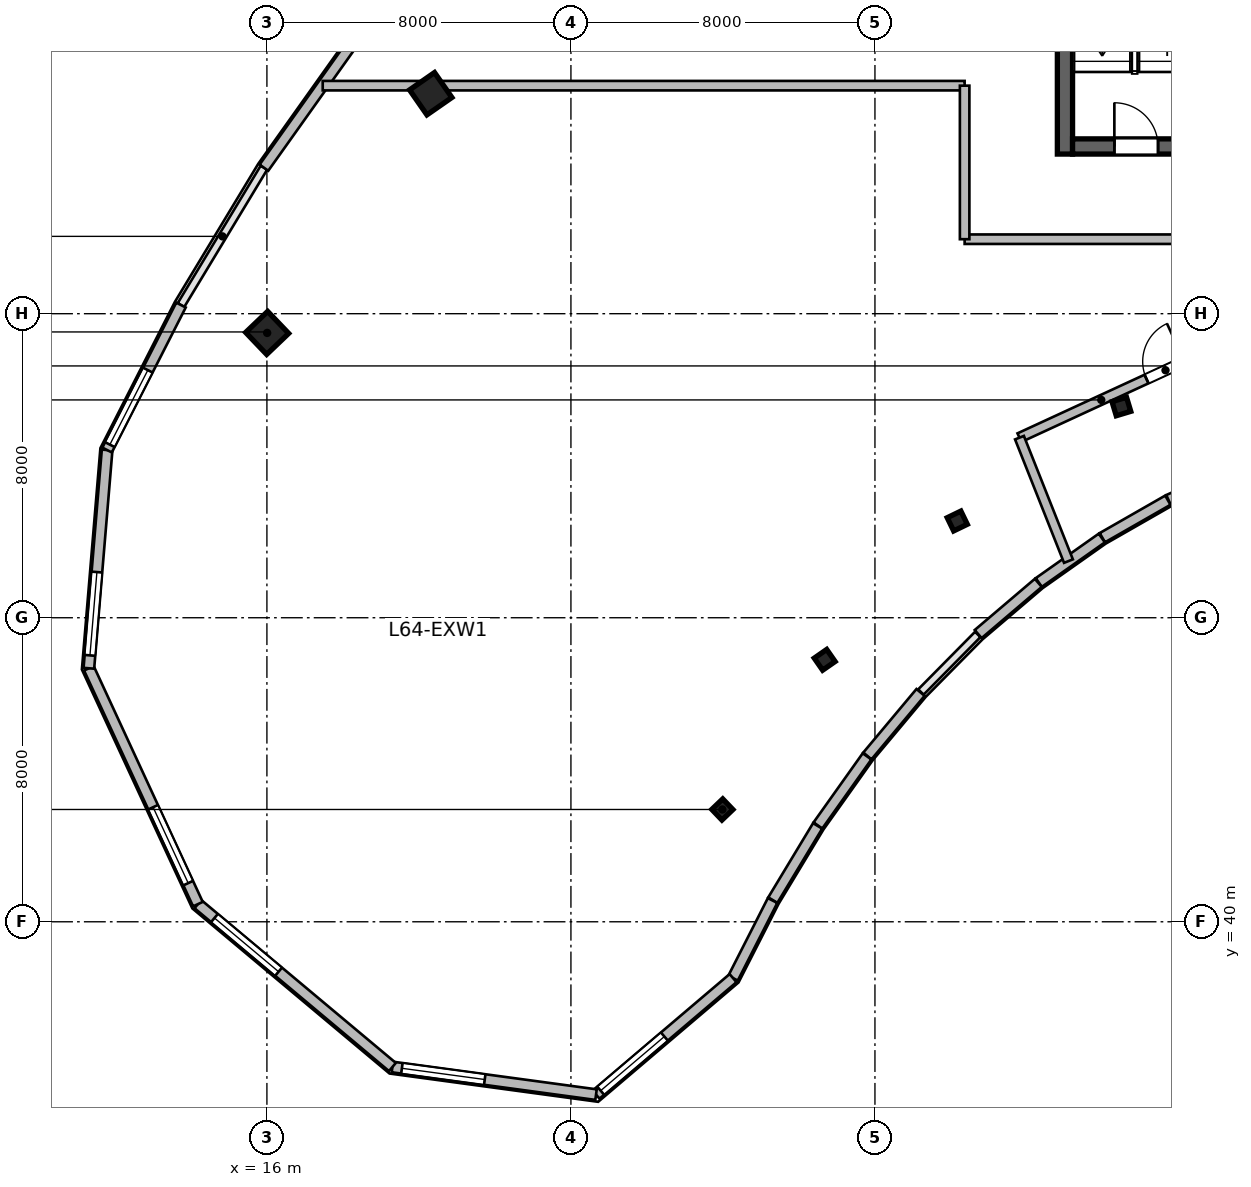
"""IFC4 building model, lengths in metres.
Left out: names, types, materials, properties, quantities, classifications, styles, units other than length and angle.
Written with IfcOpenShell. Run it as: python <this file> out.ifc"""

import sys

from ifc_helpers import new_model, si_unit, direction, frame, frame_2d, origin, origin_2d, place, context, subcontext, project, spatial, rectangle, i_section, extrude, source, transform, mapped, element, fill, save


model = new_model("IFC4")
c1 = context("Model", 3, precision=1e-05, world=origin(), true_north=direction((0.0, 1.0)))
c2 = subcontext(c1, "Body", "Model", "MODEL_VIEW")
j1 = project(units=[si_unit("LENGTHUNIT", "METRE"), si_unit("PLANEANGLEUNIT", "RADIAN")], contexts=[c1])
p1 = place(None, origin())
s1 = spatial("IfcSite", under=j1, at=p1, CompositionType="ELEMENT")
p2 = place(p1, origin())
s2 = spatial("IfcBuilding", under=s1, at=p2, CompositionType="ELEMENT")
p3 = place(p2, frame((0.0, 0.0, 264.0)))
s3 = spatial("IfcBuildingStorey", under=s2, at=p3, CompositionType="ELEMENT", Elevation=264.0)
m1 = source(origin(), c2, "Body", "SweptSolid", [
    extrude(rectangle(XDim=12.0, YDim=0.4, at=frame_2d((6.0, 0.0))), origin(), (0.0, 0.0, 1.0), 3.9),
])
p4 = place(p3, frame((37.0, 60.2, 0.0), z_axis=(0.0, 0.0, 1.0), x_axis=(0.0, 1.0, 0.0)))
e1 = element("IfcWall", 1, at=p4, inside=s3, PredefinedType="SHEAR", context=c2, shape_type="MappedRepresentation", body=[
    mapped(m1, transform((0.0, 0.0, 0.0), scale=1.0)),
])
m2 = source(origin(), c2, "Body", "SweptSolid", [
    extrude(rectangle(XDim=21.6, YDim=0.4, at=frame_2d((10.8, 0.0))), origin(), (0.0, 0.0, 1.0), 3.9),
])
p5 = place(p3, frame((37.2, 60.4, 0.0), z_axis=(0.0, 0.0, 1.0), x_axis=(1.0, 0.0, 0.0)))
e2 = element("IfcWall", 2, at=p5, inside=s3, PredefinedType="SHEAR", context=c2, shape_type="MappedRepresentation", body=[
    mapped(m2, transform((0.0, 0.0, 0.0), scale=1.0)),
])
p6 = place(p5, frame((1.1, 0.0, 0.0)))
e3 = element("IfcOpeningElement", 3, at=p6, cuts=e2, PredefinedType="OPENING", context=c2, shape_type="SweptSolid", body=[
    extrude(rectangle(XDim=1.15, YDim=2.15, at=frame_2d((0.575, 1.075))), frame((0.0, 0.21, 0.0), z_axis=(0.0, -1.0, 0.0), x_axis=(1.0, 0.0, 0.0)), (0.0, 0.0, 1.0), 0.42),
])
p7 = place(p5, frame((19.5, 0.0, 0.0)))
e4 = element("IfcOpeningElement", 4, at=p7, cuts=e2, PredefinedType="OPENING", context=c2, shape_type="SweptSolid", body=[
    extrude(rectangle(XDim=0.9, YDim=2.1, at=frame_2d((0.45, 1.05))), frame((0.0, 0.21, 0.0), z_axis=(0.0, -1.0, 0.0), x_axis=(1.0, 0.0, 0.0)), (0.0, 0.0, 1.0), 0.42),
])
p8 = place(p5, frame((12.02, 0.0, 0.0)))
e5 = element("IfcOpeningElement", 5, at=p8, cuts=e2, PredefinedType="OPENING", context=c2, shape_type="SweptSolid", body=[
    extrude(rectangle(XDim=1.6, YDim=2.15, at=frame_2d((0.8, 1.075))), frame((0.0, 0.21, 0.0), z_axis=(0.0, -1.0, 0.0), x_axis=(1.0, 0.0, 0.0)), (0.0, 0.0, 1.0), 0.42),
])
m3 = source(origin(), c2, "Body", "SweptSolid", [
    extrude(i_section(OverallWidth=0.399, OverallDepth=0.387, WebThickness=0.021, FlangeThickness=0.033, at=origin_2d()), origin(), (0.0, 0.0, 1.0), 3.9),
])
p9 = place(p3, frame((27.985, 42.955, 0.0), z_axis=(0.0, 0.0, 1.0), x_axis=(-0.690756218984, 0.723087716626, 0.0)))
e6 = element("IfcColumn", 6, at=p9, inside=s3, PredefinedType="COLUMN", context=c2, shape_type="MappedRepresentation", body=[
    mapped(m3, transform((0.0, 0.0, 0.0), scale=1.0)),
])
m4 = source(origin(), c2, "Body", "SweptSolid", [
    extrude(rectangle(XDim=0.8, YDim=0.8, at=origin_2d()), origin(), (0.0, 0.0, 1.0), 3.9),
])
p10 = place(p3, frame((16.007, 55.494, 0.0), z_axis=(0.0, 0.0, 1.0), x_axis=(-0.690756218984, 0.723087716626, 0.0)))
e7 = element("IfcColumn", 7, at=p10, inside=s3, PredefinedType="COLUMN", context=c2, shape_type="MappedRepresentation", body=[
    mapped(m4, transform((0.0, 0.0, 0.0), scale=1.0)),
])
p11 = place(p3, frame((30.677, 46.892, 0.0), z_axis=(0.0, 0.0, 1.0), x_axis=(-0.571143442153, 0.820850271661, 0.0)))
e8 = element("IfcColumn", 8, at=p11, inside=s3, PredefinedType="COLUMN", context=c2, shape_type="MappedRepresentation", body=[
    mapped(m3, transform((0.0, 0.0, 0.0), scale=1.0)),
])
p12 = place(p3, frame((20.311, 61.789, 0.0), z_axis=(0.0, 0.0, 1.0), x_axis=(-0.571143442153, 0.820850271661, 0.0)))
e9 = element("IfcColumn", 9, at=p12, inside=s3, PredefinedType="COLUMN", context=c2, shape_type="MappedRepresentation", body=[
    mapped(m4, transform((0.0, 0.0, 0.0), scale=1.0)),
])
for number, where, z_axis, x_axis in (
    (10, (34.166, 50.545, 0.0), (0.0, 0.0, 1.0), (-0.436, 0.9, 0.0)),
    (11, (38.485, 53.558, 0.0), (0.0, 0.0, 1.0), (-0.289, 0.957, 0.0)),
):
    element("IfcColumn", number, at=place(p3, frame(where, z_axis=z_axis, x_axis=x_axis)), inside=s3, PredefinedType="COLUMN", context=c2, shape_type="MappedRepresentation", body=[
        mapped(m3, transform((0.0, 0.0, 0.0), scale=1.0)),
    ])
m5 = source(origin(), c2, "Body", "SweptSolid", [
    extrude(rectangle(XDim=1.948, YDim=0.28, at=frame_2d((0.974, 0.0))), origin(), (0.0, 0.0, 1.0), 3.65),
])
p13 = place(p3, frame((41.501, 51.897, 0.0), z_axis=(0.0, 0.0, 1.0), x_axis=(-0.912712483043, -0.408602402461, 0.0)))
e12 = element("IfcWall", 12, at=p13, inside=s3, PredefinedType="SOLIDWALL", context=c2, shape_type="MappedRepresentation", body=[
    mapped(m5, transform((0.0, 0.0, 0.0), scale=1.0)),
])
m6 = source(origin(), c2, "Body", "SweptSolid", [
    extrude(rectangle(XDim=1.986, YDim=0.28, at=frame_2d((0.993, 0.0))), origin(), (0.0, 0.0, 1.0), 3.65),
])
p14 = place(p3, frame((39.708, 51.093, 0.0), z_axis=(0.0, 0.0, 1.0), x_axis=(-0.867940364671, -0.496668423976, 0.0)))
e13 = element("IfcWall", 13, at=p14, inside=s3, PredefinedType="SOLIDWALL", context=c2, shape_type="MappedRepresentation", body=[
    mapped(m6, transform((0.0, 0.0, 0.0), scale=1.0)),
])
m7 = source(origin(), c2, "Body", "SweptSolid", [
    extrude(rectangle(XDim=2.03, YDim=0.28, at=frame_2d((1.015, 0.0))), origin(), (0.0, 0.0, 1.0), 3.65),
])
p15 = place(p3, frame((37.969, 50.097, 0.0), z_axis=(0.0, 0.0, 1.0), x_axis=(-0.816987864272, -0.576654861796, 0.0)))
e14 = element("IfcWall", 14, at=p15, inside=s3, PredefinedType="SOLIDWALL", context=c2, shape_type="MappedRepresentation", body=[
    mapped(m7, transform((0.0, 0.0, 0.0), scale=1.0)),
])
m8 = source(origin(), c2, "Body", "SweptSolid", [
    extrude(rectangle(XDim=2.078, YDim=0.28, at=frame_2d((1.039, 0.0))), origin(), (0.0, 0.0, 1.0), 3.65),
])
p16 = place(p3, frame((36.298, 48.917, 0.0), z_axis=(0.0, 0.0, 1.0), x_axis=(-0.761475215802, -0.648194026291, 0.0)))
e15 = element("IfcWall", 15, at=p16, inside=s3, PredefinedType="SOLIDWALL", context=c2, shape_type="MappedRepresentation", body=[
    mapped(m8, transform((0.0, 0.0, 0.0), scale=1.0)),
])
m9 = source(origin(), c2, "Body", "SweptSolid", [
    extrude(rectangle(XDim=2.18, YDim=0.28, at=frame_2d((1.09, 0.0))), origin(), (0.0, 0.0, 1.0), 3.65),
])
p17 = place(p3, frame((33.2, 46.035, 0.0), z_axis=(0.0, 0.0, 1.0), x_axis=(-0.641835571889, -0.766842290603, 0.0)))
e16 = element("IfcWall", 16, at=p17, inside=s3, PredefinedType="SOLIDWALL", context=c2, shape_type="MappedRepresentation", body=[
    mapped(m9, transform((0.0, 0.0, 0.0), scale=1.0)),
])
m10 = source(origin(), c2, "Body", "SweptSolid", [
    extrude(rectangle(XDim=2.231, YDim=0.28, at=frame_2d((1.116, 0.0))), origin(), (0.0, 0.0, 1.0), 3.65),
])
p18 = place(p3, frame((31.792, 44.352, 0.0), z_axis=(0.0, 0.0, 1.0), x_axis=(-0.579622296598, -0.814885263879, 0.0)))
e17 = element("IfcWall", 17, at=p18, inside=s3, PredefinedType="SOLIDWALL", context=c2, shape_type="MappedRepresentation", body=[
    mapped(m10, transform((0.0, 0.0, 0.0), scale=1.0)),
])
m11 = source(origin(), c2, "Body", "SweptSolid", [
    extrude(rectangle(XDim=2.281, YDim=0.28, at=frame_2d((1.14, 0.0))), origin(), (0.0, 0.0, 1.0), 3.65),
])
p19 = place(p3, frame((30.492, 42.523, 0.0), z_axis=(0.0, 0.0, 1.0), x_axis=(-0.516917942662, -0.856034952881, 0.0)))
e18 = element("IfcWall", 18, at=p19, inside=s3, PredefinedType="SOLIDWALL", context=c2, shape_type="MappedRepresentation", body=[
    mapped(m11, transform((0.0, 0.0, 0.0), scale=1.0)),
])
m12 = source(origin(), c2, "Body", "SweptSolid", [
    extrude(rectangle(XDim=2.292, YDim=0.28, at=frame_2d((1.146, 0.0))), origin(), (0.0, 0.0, 1.0), 3.65),
])
p20 = place(p3, frame((29.306, 40.559, 0.0), z_axis=(0.0, 0.0, 1.0), x_axis=(-0.453933760778, -0.891035431858, 0.0)))
e19 = element("IfcWall", 19, at=p20, inside=s3, PredefinedType="SOLIDWALL", context=c2, shape_type="MappedRepresentation", body=[
    mapped(m12, transform((0.0, 0.0, 0.0), scale=1.0)),
])
m13 = source(origin(), c2, "Body", "SweptSolid", [
    extrude(rectangle(XDim=4.732, YDim=0.28, at=frame_2d((2.366, 0.0))), origin(), (0.0, 0.0, 1.0), 3.65),
])
p21 = place(p3, frame((28.266, 38.517, 0.0), z_axis=(0.0, 0.0, 1.0), x_axis=(-0.761912583238, -0.647679871158, 0.0)))
e20 = element("IfcWall", 20, at=p21, inside=s3, PredefinedType="SOLIDWALL", context=c2, shape_type="MappedRepresentation", body=[
    mapped(m13, transform((0.0, 0.0, 0.0), scale=1.0)),
])
p22 = place(p21, frame((2.372, 0.0, 0.95)))
e21 = element("IfcOpeningElement", 21, at=p22, cuts=e20, PredefinedType="OPENING", context=c2, shape_type="SweptSolid", body=[
    extrude(rectangle(XDim=2.2, YDim=2.1, at=frame_2d((1.1, 1.05))), frame((0.0, 0.15, 0.0), z_axis=(0.0, -1.0, 0.0), x_axis=(1.0, 0.0, 0.0)), (0.0, 0.0, 1.0), 0.3),
])
m14 = source(origin(), c2, "Body", "SweptSolid", [
    extrude(rectangle(XDim=5.408, YDim=0.28, at=frame_2d((2.704, 0.0))), origin(), (0.0, 0.0, 1.0), 3.65),
])
p23 = place(p3, frame((24.661, 35.452, 0.0), z_axis=(0.0, 0.0, 1.0), x_axis=(-0.990932903229, 0.134357661853, 0.0)))
e22 = element("IfcWall", 22, at=p23, inside=s3, PredefinedType="SOLIDWALL", context=c2, shape_type="MappedRepresentation", body=[
    mapped(m14, transform((0.0, 0.0, 0.0), scale=1.0)),
])
p24 = place(p23, frame((2.956, 0.0, 0.95)))
e23 = element("IfcOpeningElement", 23, at=p24, cuts=e22, PredefinedType="OPENING", context=c2, shape_type="SweptSolid", body=[
    extrude(rectangle(XDim=2.2, YDim=2.1, at=frame_2d((1.1, 1.05))), frame((0.0, 0.15, 0.0), z_axis=(0.0, -1.0, 0.0), x_axis=(1.0, 0.0, 0.0)), (0.0, 0.0, 1.0), 0.3),
])
m15 = source(origin(), c2, "Body", "SweptSolid", [
    extrude(rectangle(XDim=6.675, YDim=0.28, at=frame_2d((3.338, 0.0))), origin(), (0.0, 0.0, 1.0), 3.65),
])
p25 = place(p3, frame((19.302, 36.179, 0.0), z_axis=(0.0, 0.0, 1.0), x_axis=(-0.766726273546, 0.641974159491, 0.0)))
e24 = element("IfcWall", 24, at=p25, inside=s3, PredefinedType="SOLIDWALL", context=c2, shape_type="MappedRepresentation", body=[
    mapped(m15, transform((0.0, 0.0, 0.0), scale=1.0)),
])
p26 = place(p25, frame((3.906, 0.0, 0.95)))
e25 = element("IfcOpeningElement", 25, at=p26, cuts=e24, PredefinedType="OPENING", context=c2, shape_type="SweptSolid", body=[
    extrude(rectangle(XDim=2.2, YDim=2.1, at=frame_2d((1.1, 1.05))), frame((0.0, 0.15, 0.0), z_axis=(0.0, -1.0, 0.0), x_axis=(1.0, 0.0, 0.0)), (0.0, 0.0, 1.0), 0.3),
])
m16 = source(origin(), c2, "Body", "SweptSolid", [
    extrude(rectangle(XDim=6.837, YDim=0.28, at=frame_2d((3.418, 0.0))), origin(), (0.0, 0.0, 1.0), 3.65),
])
p27 = place(p3, frame((14.184, 40.464, 0.0), z_axis=(0.0, 0.0, 1.0), x_axis=(-0.419621957862, 0.907698965781, 0.0)))
e26 = element("IfcWall", 26, at=p27, inside=s3, PredefinedType="SOLIDWALL", context=c2, shape_type="MappedRepresentation", body=[
    mapped(m16, transform((0.0, 0.0, 0.0), scale=1.0)),
])
p28 = place(p27, frame((0.609, 0.0, 0.95)))
e27 = element("IfcOpeningElement", 27, at=p28, cuts=e26, PredefinedType="OPENING", context=c2, shape_type="SweptSolid", body=[
    extrude(rectangle(XDim=2.2, YDim=2.1, at=frame_2d((1.1, 1.05))), frame((0.0, 0.15, 0.0), z_axis=(0.0, -1.0, 0.0), x_axis=(1.0, 0.0, 0.0)), (0.0, 0.0, 1.0), 0.3),
])
m17 = source(origin(), c2, "Body", "SweptSolid", [
    extrude(rectangle(XDim=5.763, YDim=0.28, at=frame_2d((2.881, 0.0))), origin(), (0.0, 0.0, 1.0), 3.65),
])
p29 = place(p3, frame((11.315, 46.67, 0.0), z_axis=(0.0, 0.0, 1.0), x_axis=(0.083290906041, 0.996525275631, 0.0)))
e28 = element("IfcWall", 28, at=p29, inside=s3, PredefinedType="SOLIDWALL", context=c2, shape_type="MappedRepresentation", body=[
    mapped(m17, transform((0.0, 0.0, 0.0), scale=1.0)),
])
p30 = place(p29, frame((0.341, 0.0, 0.95)))
e29 = element("IfcOpeningElement", 29, at=p30, cuts=e28, PredefinedType="OPENING", context=c2, shape_type="SweptSolid", body=[
    extrude(rectangle(XDim=2.2, YDim=2.1, at=frame_2d((1.1, 1.05))), frame((0.0, 0.15, 0.0), z_axis=(0.0, -1.0, 0.0), x_axis=(1.0, 0.0, 0.0)), (0.0, 0.0, 1.0), 0.3),
])
m18 = source(origin(), c2, "Body", "SweptSolid", [
    extrude(rectangle(XDim=4.281, YDim=0.28, at=frame_2d((2.141, 0.0))), origin(), (0.0, 0.0, 1.0), 3.65),
])
p31 = place(p3, frame((11.795, 52.413, 0.0), z_axis=(0.0, 0.0, 1.0), x_axis=(0.454020597637, 0.890991187903, 0.0)))
e30 = element("IfcWall", 30, at=p31, inside=s3, PredefinedType="SOLIDWALL", context=c2, shape_type="MappedRepresentation", body=[
    mapped(m18, transform((0.0, 0.0, 0.0), scale=1.0)),
])
p32 = place(p31, frame((0.16, 0.0, 0.95)))
e31 = element("IfcOpeningElement", 31, at=p32, cuts=e30, PredefinedType="OPENING", context=c2, shape_type="SweptSolid", body=[
    extrude(rectangle(XDim=2.2, YDim=2.1, at=frame_2d((1.1, 1.05))), frame((0.0, 0.15, 0.0), z_axis=(0.0, -1.0, 0.0), x_axis=(1.0, 0.0, 0.0)), (0.0, 0.0, 1.0), 0.3),
])
m19 = source(origin(), c2, "Body", "SweptSolid", [
    extrude(rectangle(XDim=4.129, YDim=0.28, at=frame_2d((2.065, 0.0))), origin(), (0.0, 0.0, 1.0), 3.65),
])
p33 = place(p3, frame((15.921, 59.842, 0.0), z_axis=(0.0, 0.0, 1.0), x_axis=(0.57959272029, 0.814906300495, 0.0)))
e32 = element("IfcWall", 32, at=p33, inside=s3, PredefinedType="SOLIDWALL", context=c2, shape_type="MappedRepresentation", body=[
    mapped(m19, transform((0.0, 0.0, 0.0), scale=1.0)),
])
m20 = source(origin(), c2, "Body", "SweptSolid", [
    extrude(rectangle(XDim=8.464, YDim=0.25, at=frame_2d((4.232, 0.0))), origin(), (0.0, 0.0, 1.0), 3.65),
])
p34 = place(p3, frame((35.803, 52.738, 0.0), z_axis=(0.0, 0.0, 1.0), x_axis=(0.90801678306, 0.418933791524, 0.0)))
e33 = element("IfcWall", 33, at=p34, inside=s3, PredefinedType="PARTITIONING", context=c2, shape_type="MappedRepresentation", body=[
    mapped(m20, transform((0.0, 0.0, 0.0), scale=1.0)),
])
p35 = place(p34, frame((3.682, 0.0, 0.0)))
e34 = element("IfcOpeningElement", 34, at=p35, cuts=e33, PredefinedType="OPENING", context=c2, shape_type="SweptSolid", body=[
    extrude(rectangle(XDim=1.1, YDim=2.15, at=frame_2d((0.55, 1.075))), frame((0.0, 0.135, 0.0), z_axis=(0.0, -1.0, 0.0), x_axis=(1.0, 0.0, 0.0)), (0.0, 0.0, 1.0), 0.27),
])
m21 = source(origin(), c2, "Body", "SweptSolid", [
    extrude(rectangle(XDim=3.495, YDim=0.25, at=frame_2d((1.747, 0.0))), origin(), (0.0, 0.0, 1.0), 3.65),
])
p36 = place(p3, frame((37.092, 49.49, 0.0), z_axis=(0.0, 0.0, 1.0), x_axis=(-0.368859890644, 0.929485008526, 0.0)))
e35 = element("IfcWall", 35, at=p36, inside=s3, PredefinedType="PARTITIONING", context=c2, shape_type="MappedRepresentation", body=[
    mapped(m21, transform((0.0, 0.0, 0.0), scale=1.0)),
])
m22 = source(origin(), c2, "Body", "SweptSolid", [
    extrude(rectangle(XDim=12.39, YDim=0.25, at=frame_2d((6.195, 0.0))), origin(), (0.0, 0.0, 1.0), 3.65),
])
p37 = place(p3, frame((34.36, 57.96, 0.0), z_axis=(0.0, 0.0, 1.0), x_axis=(1.0, 0.0, 0.0)))
e36 = element("IfcWall", 36, at=p37, inside=s3, PredefinedType="PARTITIONING", context=c2, shape_type="MappedRepresentation", body=[
    mapped(m22, transform((0.0, 0.0, 0.0), scale=1.0)),
])
m23 = source(origin(), c2, "Body", "SweptSolid", [
    extrude(rectangle(XDim=16.892, YDim=0.25, at=frame_2d((8.446, 0.0))), origin(), (0.0, 0.0, 1.0), 3.65),
])
p38 = place(p3, frame((17.469, 62.0, 0.0), z_axis=(0.0, 0.0, 1.0), x_axis=(1.0, 0.0, 0.0)))
e37 = element("IfcWall", 37, at=p38, inside=s3, PredefinedType="PARTITIONING", context=c2, shape_type="MappedRepresentation", body=[
    mapped(m23, transform((0.0, 0.0, 0.0), scale=1.0)),
])
m24 = source(origin(), c2, "Body", "SweptSolid", [
    extrude(rectangle(XDim=4.04, YDim=0.25, at=frame_2d((2.02, 0.0))), origin(), (0.0, 0.0, 1.0), 3.65),
])
p39 = place(p3, frame((34.36, 57.96, 0.0), z_axis=(0.0, 0.0, 1.0), x_axis=(0.0, 1.0, 0.0)))
e38 = element("IfcWall", 38, at=p39, inside=s3, PredefinedType="PARTITIONING", context=c2, shape_type="MappedRepresentation", body=[
    mapped(m24, transform((0.0, 0.0, 0.0), scale=1.0)),
])
m25 = source(origin(), c2, "Body", "SweptSolid", [
    extrude(rectangle(XDim=2.2, YDim=2.1, at=frame_2d((1.1, 1.05))), frame((0.0, 0.03, 0.0), z_axis=(0.0, -1.0, 0.0), x_axis=(1.0, 0.0, 0.0)), (0.0, 0.0, 1.0), 0.06),
])
p40 = place(p22, origin())
e39 = element("IfcWindow", 39, at=p40, inside=s3, PartitioningType="TRIPLE_PANEL_VERTICAL", PredefinedType="WINDOW", context=c2, shape_type="MappedRepresentation", body=[
    mapped(m25, transform((0.0, 0.0, 0.0), scale=1.0)),
])
fill(e21, e39)
p41 = place(p24, origin())
e40 = element("IfcWindow", 40, at=p41, inside=s3, PartitioningType="TRIPLE_PANEL_VERTICAL", PredefinedType="WINDOW", context=c2, shape_type="MappedRepresentation", body=[
    mapped(m25, transform((0.0, 0.0, 0.0), scale=1.0)),
])
fill(e23, e40)
p42 = place(p26, origin())
e41 = element("IfcWindow", 41, at=p42, inside=s3, PartitioningType="TRIPLE_PANEL_VERTICAL", PredefinedType="WINDOW", context=c2, shape_type="MappedRepresentation", body=[
    mapped(m25, transform((0.0, 0.0, 0.0), scale=1.0)),
])
fill(e25, e41)
p43 = place(p28, origin())
e42 = element("IfcWindow", 42, at=p43, inside=s3, PartitioningType="TRIPLE_PANEL_VERTICAL", PredefinedType="WINDOW", context=c2, shape_type="MappedRepresentation", body=[
    mapped(m25, transform((0.0, 0.0, 0.0), scale=1.0)),
])
fill(e27, e42)
p44 = place(p30, origin())
e43 = element("IfcWindow", 43, at=p44, inside=s3, PartitioningType="TRIPLE_PANEL_VERTICAL", PredefinedType="WINDOW", context=c2, shape_type="MappedRepresentation", body=[
    mapped(m25, transform((0.0, 0.0, 0.0), scale=1.0)),
])
fill(e29, e43)
p45 = place(p32, origin())
e44 = element("IfcWindow", 44, at=p45, inside=s3, PartitioningType="TRIPLE_PANEL_VERTICAL", PredefinedType="WINDOW", context=c2, shape_type="MappedRepresentation", body=[
    mapped(m25, transform((0.0, 0.0, 0.0), scale=1.0)),
])
fill(e31, e44)
m26 = source(origin(), c2, "Body", "SweptSolid", [
    extrude(rectangle(XDim=1.15, YDim=2.15, at=frame_2d((0.575, 1.075))), frame((0.0, 0.025, 0.0), z_axis=(0.0, -1.0, 0.0), x_axis=(1.0, 0.0, 0.0)), (0.0, 0.0, 1.0), 0.05),
])
p46 = place(p6, origin())
e45 = element("IfcDoor", 45, at=p46, inside=s3, OperationType="SINGLE_SWING_LEFT", PredefinedType="DOOR", context=c2, shape_type="MappedRepresentation", body=[
    mapped(m26, transform((0.0, 0.0, 0.0), scale=1.0)),
])
fill(e3, e45)
m27 = source(origin(), c2, "Body", "SweptSolid", [
    extrude(rectangle(XDim=1.1, YDim=2.15, at=frame_2d((0.55, 1.075))), frame((0.0, 0.025, 0.0), z_axis=(0.0, -1.0, 0.0), x_axis=(1.0, 0.0, 0.0)), (0.0, 0.0, 1.0), 0.05),
])
p47 = place(p35, origin())
e46 = element("IfcDoor", 46, at=p47, inside=s3, OperationType="SINGLE_SWING_RIGHT", PredefinedType="DOOR", context=c2, shape_type="MappedRepresentation", body=[
    mapped(m27, transform((0.0, 0.0, 0.0), scale=1.0)),
])
fill(e34, e46)
save(model, sys.argv[1])
